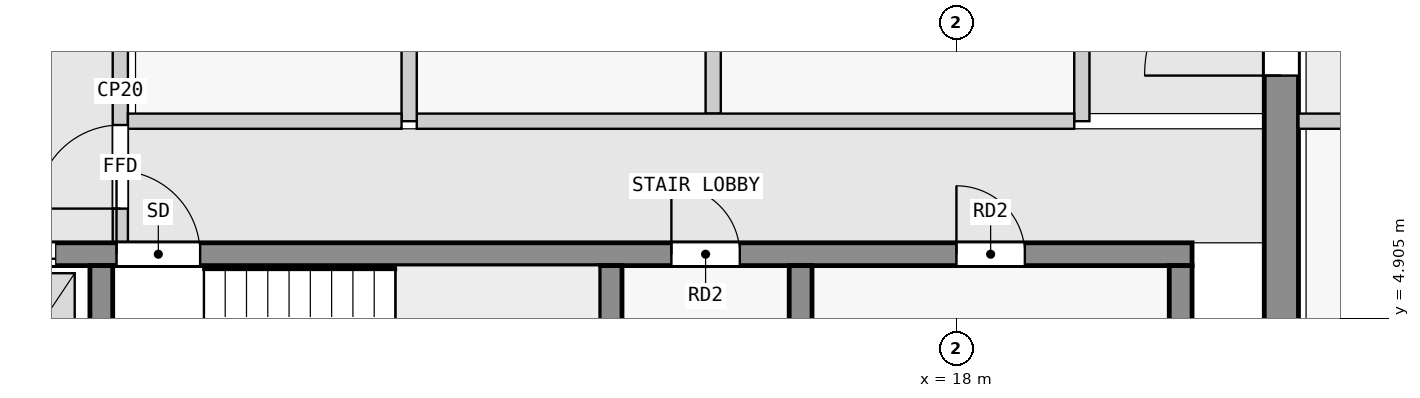
"""IFC4 building model, lengths in metres.
Left out: names, types, materials, properties, quantities, classifications, styles, units other than length and angle.
Written with IfcOpenShell. Run it as: python <this file> out.ifc"""

import sys

from ifc_helpers import new_model, si_unit, direction, frame, frame_2d, origin, place, context, subcontext, project, spatial, rectangle, extrude, element, fill, save


model = new_model("IFC4")
c1 = context("Model", 3, precision=1e-05, world=origin(), true_north=direction((0.0, 1.0)))
c2 = subcontext(c1, "Body", "Model", "MODEL_VIEW")
j1 = project(units=[si_unit("LENGTHUNIT", "METRE"), si_unit("PLANEANGLEUNIT", "RADIAN")], contexts=[c1])
p1 = place(None, origin())
s1 = spatial("IfcSite", under=j1, at=p1, CompositionType="ELEMENT")
p2 = place(p1, origin())
s2 = spatial("IfcBuilding", under=s1, at=p2, CompositionType="ELEMENT")
p3 = place(p2, frame((0.0, 0.0, 291.4)))
s3 = spatial("IfcBuildingStorey", under=s2, at=p3, CompositionType="ELEMENT", Elevation=291.4)
p4 = place(p3, frame((22.275, 2.5, 0.0), z_axis=(0.0, 0.0, 1.0), x_axis=(0.0, 1.0, 0.0)))
e1 = element("IfcWall", 1, at=p4, inside=s3, PredefinedType="SHEAR", context=c2, shape_type="SweptSolid", body=[
    extrude(rectangle(XDim=15.05, YDim=0.45, at=frame_2d((7.525, 0.0))), origin(), (0.0, 0.0, 1.0), 3.05),
])
p5 = place(p4, frame((5.6, 0.0, 0.0)))
e2 = element("IfcOpeningElement", 2, at=p5, cuts=e1, PredefinedType="OPENING", context=c2, shape_type="SweptSolid", body=[
    extrude(rectangle(XDim=1.8, YDim=2.1, at=frame_2d((0.9, 1.05))), frame((0.0, 0.235, 0.0), z_axis=(0.0, -1.0, 0.0), x_axis=(1.0, 0.0, 0.0)), (0.0, 0.0, 1.0), 0.47),
])
for number, where, z_axis, x_axis in (
    (3, (6.75, 2.8, 0.0), (0.0, 0.0, 1.0), (0.0, 1.0, 0.0)),
    (4, (13.45, 2.8, 0.0), (0.0, 0.0, 1.0), (0.0, 1.0, 0.0)),
    (5, (15.95, 2.8, 0.0), (0.0, 0.0, 1.0), (0.0, 1.0, 0.0)),
    (6, (20.95, 2.8, 0.0), (0.0, 0.0, 1.0), (0.0, 1.0, 0.0)),
):
    element("IfcWall", number, at=place(p3, frame(where, z_axis=z_axis, x_axis=x_axis)), inside=s3, PredefinedType="SHEAR", context=c2, shape_type="SweptSolid", body=[
        extrude(rectangle(XDim=2.8, YDim=0.3, at=frame_2d((1.4, 0.0))), origin(), (0.0, 0.0, 1.0), 3.05),
    ])
p6 = place(p3, frame((2.3, 5.75, 0.0), z_axis=(0.0, 0.0, 1.0), x_axis=(1.0, 0.0, 0.0)))
e7 = element("IfcWall", 7, at=p6, inside=s3, PredefinedType="SHEAR", context=c2, shape_type="SweptSolid", body=[
    extrude(rectangle(XDim=18.8, YDim=0.3, at=frame_2d((9.4, 0.0))), origin(), (0.0, 0.0, 1.0), 3.05),
])
p7 = place(p6, frame((4.65, 0.0, 0.0)))
e8 = element("IfcOpeningElement", 8, at=p7, cuts=e7, PredefinedType="OPENING", context=c2, shape_type="SweptSolid", body=[
    extrude(rectangle(XDim=1.1, YDim=2.1, at=frame_2d((0.55, 1.05))), frame((0.0, 0.16, 0.0), z_axis=(0.0, -1.0, 0.0), x_axis=(1.0, 0.0, 0.0)), (0.0, 0.0, 1.0), 0.32),
])
p8 = place(p6, frame((0.45, 0.0, 0.0)))
e9 = element("IfcOpeningElement", 9, at=p8, cuts=e7, PredefinedType="OPENING", context=c2, shape_type="SweptSolid", body=[
    extrude(rectangle(XDim=1.1, YDim=2.1, at=frame_2d((0.55, 1.05))), frame((0.0, 0.16, 0.0), z_axis=(0.0, -1.0, 0.0), x_axis=(1.0, 0.0, 0.0)), (0.0, 0.0, 1.0), 0.32),
])
p9 = place(p6, frame((2.75, 0.0, 0.0)))
e10 = element("IfcOpeningElement", 10, at=p9, cuts=e7, PredefinedType="OPENING", context=c2, shape_type="SweptSolid", body=[
    extrude(rectangle(XDim=1.1, YDim=2.1, at=frame_2d((0.55, 1.05))), frame((0.0, 0.16, 0.0), z_axis=(0.0, -1.0, 0.0), x_axis=(1.0, 0.0, 0.0)), (0.0, 0.0, 1.0), 0.32),
])
p10 = place(p6, frame((11.95, 0.0, 0.0)))
e11 = element("IfcOpeningElement", 11, at=p10, cuts=e7, PredefinedType="OPENING", context=c2, shape_type="SweptSolid", body=[
    extrude(rectangle(XDim=0.9, YDim=2.1, at=frame_2d((0.45, 1.05))), frame((0.0, 0.16, 0.0), z_axis=(0.0, -1.0, 0.0), x_axis=(1.0, 0.0, 0.0)), (0.0, 0.0, 1.0), 0.32),
])
p11 = place(p6, frame((15.7, 0.0, 0.0)))
e12 = element("IfcOpeningElement", 12, at=p11, cuts=e7, PredefinedType="OPENING", context=c2, shape_type="SweptSolid", body=[
    extrude(rectangle(XDim=0.9, YDim=2.1, at=frame_2d((0.45, 1.05))), frame((0.0, 0.16, 0.0), z_axis=(0.0, -1.0, 0.0), x_axis=(1.0, 0.0, 0.0)), (0.0, 0.0, 1.0), 0.32),
])
p12 = place(p3, frame((7.0, 5.9, 0.0), z_axis=(0.0, 0.0, 1.0), x_axis=(0.0, 1.0, 0.0)))
e13 = element("IfcWall", 13, at=p12, inside=s3, PredefinedType="PARTITIONING", context=c2, shape_type="SweptSolid", body=[
    extrude(rectangle(XDim=4.0, YDim=0.2, at=frame_2d((2.0, 0.0))), origin(), (0.0, 0.0, 1.0), 3.05),
])
p13 = place(p12, frame((0.45, 0.0, 0.0)))
e14 = element("IfcOpeningElement", 14, at=p13, cuts=e13, PredefinedType="OPENING", context=c2, shape_type="SweptSolid", body=[
    extrude(rectangle(XDim=1.1, YDim=2.1, at=frame_2d((0.55, 1.05))), frame((0.0, 0.11, 0.0), z_axis=(0.0, -1.0, 0.0), x_axis=(1.0, 0.0, 0.0)), (0.0, 0.0, 1.0), 0.22),
])
p14 = place(p3, frame((7.1, 7.5, 0.0), z_axis=(0.0, 0.0, 1.0), x_axis=(1.0, 0.0, 0.0)))
e15 = element("IfcWall", 15, at=p14, inside=s3, PredefinedType="PARTITIONING", context=c2, shape_type="SweptSolid", body=[
    extrude(rectangle(XDim=3.6, YDim=0.2, at=frame_2d((1.8, 0.0))), origin(), (0.0, 0.0, 1.0), 3.05),
])
p15 = place(p3, frame((10.8, 7.5, 0.0), z_axis=(0.0, 0.0, 1.0), x_axis=(0.0, 1.0, 0.0)))
e16 = element("IfcWall", 16, at=p15, inside=s3, PredefinedType="PARTITIONING", context=c2, shape_type="SweptSolid", body=[
    extrude(rectangle(XDim=4.7, YDim=0.2, at=frame_2d((2.35, 0.0))), origin(), (0.0, 0.0, 1.0), 3.05),
])
p16 = place(p3, frame((10.9, 7.5, 0.0), z_axis=(0.0, 0.0, 1.0), x_axis=(1.0, 0.0, 0.0)))
e17 = element("IfcWall", 17, at=p16, inside=s3, PredefinedType="PARTITIONING", context=c2, shape_type="SweptSolid", body=[
    extrude(rectangle(XDim=8.65, YDim=0.2, at=frame_2d((4.325, 0.0))), origin(), (0.0, 0.0, 1.0), 3.05),
])
p17 = place(p3, frame((19.65, 7.5, 0.0), z_axis=(0.0, 0.0, 1.0), x_axis=(0.0, 1.0, 0.0)))
e18 = element("IfcWall", 18, at=p17, inside=s3, PredefinedType="PARTITIONING", context=c2, shape_type="SweptSolid", body=[
    extrude(rectangle(XDim=4.7, YDim=0.2, at=frame_2d((2.35, 0.0))), origin(), (0.0, 0.0, 1.0), 3.05),
])
p18 = place(p3, frame((14.8, 7.6, 0.0), z_axis=(0.0, 0.0, 1.0), x_axis=(0.0, 1.0, 0.0)))
e19 = element("IfcWall", 19, at=p18, inside=s3, PredefinedType="PARTITIONING", context=c2, shape_type="SweptSolid", body=[
    extrude(rectangle(XDim=4.5, YDim=0.2, at=frame_2d((2.25, 0.0))), origin(), (0.0, 0.0, 1.0), 3.05),
])
p19 = place(p3, frame((31.5, 7.5, 0.0), z_axis=(0.0, 0.0, 1.0), x_axis=(-1.0, 0.0, 0.0)))
e20 = element("IfcWall", 20, at=p19, inside=s3, PredefinedType="PARTITIONING", context=c2, shape_type="SweptSolid", body=[
    extrude(rectangle(XDim=9.0, YDim=0.2, at=frame_2d((4.5, 0.0))), origin(), (0.0, 0.0, 1.0), 3.05),
])
p20 = place(p19, frame((3.6, 0.0, 0.0)))
e21 = element("IfcOpeningElement", 21, at=p20, cuts=e20, PredefinedType="OPENING", context=c2, shape_type="SweptSolid", body=[
    extrude(rectangle(XDim=1.8, YDim=2.1, at=frame_2d((0.9, 1.05))), frame((0.0, 0.11, 0.0), z_axis=(0.0, -1.0, 0.0), x_axis=(1.0, 0.0, 0.0)), (0.0, 0.0, 1.0), 0.22),
])
p21 = place(p13, origin())
e22 = element("IfcDoor", 22, at=p21, inside=s3, OperationType="SINGLE_SWING_LEFT", PredefinedType="DOOR", context=c2, shape_type="SweptSolid", body=[
    extrude(rectangle(XDim=1.1, YDim=2.1, at=frame_2d((0.55, 1.05))), frame((0.0, 0.025, 0.0), z_axis=(0.0, -1.0, 0.0), x_axis=(1.0, 0.0, 0.0)), (0.0, 0.0, 1.0), 0.05),
])
fill(e14, e22)
p22 = place(p7, origin())
e23 = element("IfcDoor", 23, at=p22, inside=s3, OperationType="SINGLE_SWING_LEFT", PredefinedType="DOOR", context=c2, shape_type="SweptSolid", body=[
    extrude(rectangle(XDim=1.1, YDim=2.1, at=frame_2d((0.55, 1.05))), frame((0.0, 0.025, 0.0), z_axis=(0.0, -1.0, 0.0), x_axis=(1.0, 0.0, 0.0)), (0.0, 0.0, 1.0), 0.05),
])
fill(e8, e23)
p23 = place(p9, origin())
e24 = element("IfcDoor", 24, at=p23, inside=s3, OperationType="DOUBLE_DOOR_SLIDING", PredefinedType="DOOR", context=c2, shape_type="SweptSolid", body=[
    extrude(rectangle(XDim=1.1, YDim=2.1, at=frame_2d((0.55, 1.05))), frame((0.0, 0.025, 0.0), z_axis=(0.0, -1.0, 0.0), x_axis=(1.0, 0.0, 0.0)), (0.0, 0.0, 1.0), 0.05),
])
fill(e10, e24)
p24 = place(p5, origin())
e25 = element("IfcDoor", 25, at=p24, inside=s3, OperationType="DOUBLE_DOOR_SINGLE_SWING", PredefinedType="DOOR", context=c2, shape_type="SweptSolid", body=[
    extrude(rectangle(XDim=1.8, YDim=2.1, at=frame_2d((0.9, 1.05))), frame((0.0, 0.025, 0.0), z_axis=(0.0, -1.0, 0.0), x_axis=(1.0, 0.0, 0.0)), (0.0, 0.0, 1.0), 0.05),
])
fill(e2, e25)
p25 = place(p10, origin())
e26 = element("IfcDoor", 26, at=p25, inside=s3, OperationType="SINGLE_SWING_LEFT", PredefinedType="DOOR", context=c2, shape_type="SweptSolid", body=[
    extrude(rectangle(XDim=0.9, YDim=2.1, at=frame_2d((0.45, 1.05))), frame((0.0, 0.025, 0.0), z_axis=(0.0, -1.0, 0.0), x_axis=(1.0, 0.0, 0.0)), (0.0, 0.0, 1.0), 0.05),
])
fill(e11, e26)
p26 = place(p11, origin())
e27 = element("IfcDoor", 27, at=p26, inside=s3, OperationType="SINGLE_SWING_LEFT", PredefinedType="DOOR", context=c2, shape_type="SweptSolid", body=[
    extrude(rectangle(XDim=0.9, YDim=2.1, at=frame_2d((0.45, 1.05))), frame((0.0, 0.025, 0.0), z_axis=(0.0, -1.0, 0.0), x_axis=(1.0, 0.0, 0.0)), (0.0, 0.0, 1.0), 0.05),
])
fill(e12, e27)
save(model, sys.argv[1])
